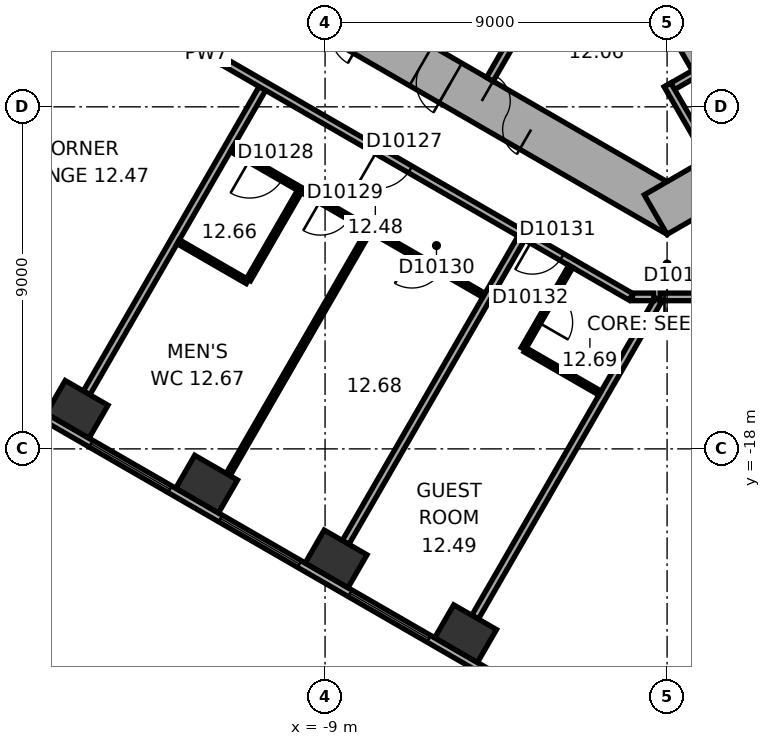
"""IFC4 building model, lengths in metres.
Left out: names, types, materials, properties, quantities, classifications, styles, units other than length and angle.
Written with IfcOpenShell. Run it as: python <this file> out.ifc"""

import sys

from ifc_helpers import new_model, si_unit, direction, frame, frame_2d, origin, origin_2d, place, context, subcontext, project, spatial, rectangle, extrude, element, fill, save


model = new_model("IFC4")
c1 = context("Model", 3, precision=1e-05, world=origin(), true_north=direction((0.0, 1.0)))
c2 = subcontext(c1, "Body", "Model", "MODEL_VIEW")
j1 = project(units=[si_unit("LENGTHUNIT", "METRE"), si_unit("PLANEANGLEUNIT", "RADIAN")], contexts=[c1])
p1 = place(None, origin())
s1 = spatial("IfcSite", under=j1, at=p1, CompositionType="ELEMENT")
p2 = place(p1, origin())
s2 = spatial("IfcBuilding", under=s1, at=p2, CompositionType="ELEMENT")
p3 = place(p2, frame((0.0, 0.0, 60.5)))
s3 = spatial("IfcBuildingStorey", under=s2, at=p3, CompositionType="ELEMENT", Elevation=60.5)
for number, where, z_axis, x_axis in (
    (1, (-15.524, -16.96, 0.0), (0.0, 0.0, 1.0), (0.866, -0.5, 0.0)),
    (2, (-12.117, -18.927, 0.0), (0.0, 0.0, 1.0), (0.866, -0.5, 0.0)),
    (3, (-8.71, -20.895, 0.0), (0.0, 0.0, 1.0), (0.866, -0.5, 0.0)),
    (4, (-5.302, -22.862, 0.0), (0.0, 0.0, 1.0), (0.866, -0.5, 0.0)),
):
    element("IfcColumn", number, at=place(p3, frame(where, z_axis=z_axis, x_axis=x_axis)), inside=s3, PredefinedType="COLUMN", context=c2, shape_type="SweptSolid", body=[
        extrude(rectangle(XDim=1.3, YDim=1.0, at=origin_2d()), origin(), (0.0, 0.0, 1.0), 3.3),
    ])
p4 = place(p3, frame((-10.4, -5.658, 0.0), z_axis=(0.0, 0.0, 1.0), x_axis=(0.866021384402, -0.500006961711, 0.0)))
e5 = element("IfcWall", 5, at=p4, inside=s3, PredefinedType="SHEAR", context=c2, shape_type="SweptSolid", body=[
    extrude(rectangle(XDim=12.355, YDim=1.2, at=frame_2d((6.178, 0.0))), origin(), (0.0, 0.0, 1.0), 3.3),
])
p5 = place(p4, frame((6.378, 0.0, 0.0)))
e6 = element("IfcOpeningElement", 6, at=p5, cuts=e5, PredefinedType="OPENING", context=c2, shape_type="SweptSolid", body=[
    extrude(rectangle(XDim=1.5, YDim=2.1, at=frame_2d((0.75, 1.05))), frame((0.0, 0.61, 0.0), z_axis=(0.0, -1.0, 0.0), x_axis=(1.0, 0.0, 0.0)), (0.0, 0.0, 1.0), 1.22),
])
p6 = place(p4, frame((1.928, 0.0, 0.0)))
e7 = element("IfcOpeningElement", 7, at=p6, cuts=e5, PredefinedType="OPENING", context=c2, shape_type="SweptSolid", body=[
    extrude(rectangle(XDim=0.9, YDim=2.1, at=frame_2d((0.45, 1.05))), frame((0.0, 0.61, 0.0), z_axis=(0.0, -1.0, 0.0), x_axis=(1.0, 0.0, 0.0)), (0.0, 0.0, 1.0), 1.22),
])
p7 = place(p4, frame((4.528, 0.0, 0.0)))
e8 = element("IfcOpeningElement", 8, at=p7, cuts=e5, PredefinedType="OPENING", context=c2, shape_type="SweptSolid", body=[
    extrude(rectangle(XDim=0.9, YDim=2.1, at=frame_2d((0.45, 1.05))), frame((0.0, 0.61, 0.0), z_axis=(0.0, -1.0, 0.0), x_axis=(1.0, 0.0, 0.0)), (0.0, 0.0, 1.0), 1.22),
])
p8 = place(p3, frame((-0.3, -11.836, 0.0), z_axis=(0.0, 0.0, 1.0), x_axis=(0.866021384402, 0.500006961711, 0.0)))
e9 = element("IfcWall", 9, at=p8, inside=s3, PredefinedType="SHEAR", context=c2, shape_type="SweptSolid", body=[
    extrude(rectangle(XDim=12.355, YDim=1.2, at=frame_2d((6.178, 0.0))), origin(), (0.0, 0.0, 1.0), 3.3),
])
p9 = place(p8, frame((4.128, 0.0, 0.0)))
e10 = element("IfcOpeningElement", 10, at=p9, cuts=e9, PredefinedType="OPENING", context=c2, shape_type="SweptSolid", body=[
    extrude(rectangle(XDim=0.9, YDim=2.1, at=frame_2d((0.45, 1.05))), frame((0.0, 0.61, 0.0), z_axis=(0.0, -1.0, 0.0), x_axis=(1.0, 0.0, 0.0)), (0.0, 0.0, 1.0), 1.22),
])
p10 = place(p8, frame((7.928, 0.0, 0.0)))
e11 = element("IfcOpeningElement", 11, at=p10, cuts=e9, PredefinedType="OPENING", context=c2, shape_type="SweptSolid", body=[
    extrude(rectangle(XDim=1.1, YDim=2.1, at=frame_2d((0.55, 1.05))), frame((0.0, 0.61, 0.0), z_axis=(0.0, -1.0, 0.0), x_axis=(1.0, 0.0, 0.0)), (0.0, 0.0, 1.0), 1.22),
])
p11 = place(p3, frame((-19.914, -15.119, 0.0), z_axis=(0.0, 0.0, 1.0), x_axis=(0.866025418898, -0.499999973822, 0.0)))
e12 = element("IfcWall", 12, at=p11, inside=s3, PredefinedType="STANDARD", context=c2, shape_type="SweptSolid", body=[
    extrude(rectangle(XDim=21.246, YDim=0.2, at=frame_2d((10.623, 0.0))), origin(), (0.0, 0.0, 1.0), 3.3),
])
p12 = place(p11, frame((1.555, 0.0, 0.8)))
e13 = element("IfcOpeningElement", 13, at=p12, cuts=e12, PredefinedType="OPENING", context=c2, shape_type="SweptSolid", body=[
    extrude(rectangle(XDim=2.4, YDim=1.7, at=frame_2d((1.2, 0.85))), frame((0.0, 0.11, 0.0), z_axis=(0.0, -1.0, 0.0), x_axis=(1.0, 0.0, 0.0)), (0.0, 0.0, 1.0), 0.22),
])
p13 = place(p11, frame((5.489, 0.0, 0.8)))
e14 = element("IfcOpeningElement", 14, at=p13, cuts=e12, PredefinedType="OPENING", context=c2, shape_type="SweptSolid", body=[
    extrude(rectangle(XDim=2.4, YDim=1.7, at=frame_2d((1.2, 0.85))), frame((0.0, 0.11, 0.0), z_axis=(0.0, -1.0, 0.0), x_axis=(1.0, 0.0, 0.0)), (0.0, 0.0, 1.0), 0.22),
])
p14 = place(p11, frame((9.424, 0.0, 0.8)))
e15 = element("IfcOpeningElement", 15, at=p14, cuts=e12, PredefinedType="OPENING", context=c2, shape_type="SweptSolid", body=[
    extrude(rectangle(XDim=2.4, YDim=1.7, at=frame_2d((1.2, 0.85))), frame((0.0, 0.11, 0.0), z_axis=(0.0, -1.0, 0.0), x_axis=(1.0, 0.0, 0.0)), (0.0, 0.0, 1.0), 0.22),
])
p15 = place(p11, frame((13.358, 0.0, 0.8)))
e16 = element("IfcOpeningElement", 16, at=p15, cuts=e12, PredefinedType="OPENING", context=c2, shape_type="SweptSolid", body=[
    extrude(rectangle(XDim=2.4, YDim=1.7, at=frame_2d((1.2, 0.85))), frame((0.0, 0.11, 0.0), z_axis=(0.0, -1.0, 0.0), x_axis=(1.0, 0.0, 0.0)), (0.0, 0.0, 1.0), 0.22),
])
p16 = place(p11, frame((17.293, 0.0, 0.8)))
e17 = element("IfcOpeningElement", 17, at=p16, cuts=e12, PredefinedType="OPENING", context=c2, shape_type="SweptSolid", body=[
    extrude(rectangle(XDim=2.4, YDim=1.7, at=frame_2d((1.2, 0.85))), frame((0.0, 0.11, 0.0), z_axis=(0.0, -1.0, 0.0), x_axis=(1.0, 0.0, 0.0)), (0.0, 0.0, 1.0), 0.22),
])
p17 = place(p3, frame((-3.563, -6.372, 0.0), z_axis=(0.0, 0.0, 1.0), x_axis=(-0.499994660107, -0.866028486751, 0.0)))
e18 = element("IfcWall", 18, at=p17, inside=s3, PredefinedType="PARTITIONING", context=c2, shape_type="SweptSolid", body=[
    extrude(rectangle(XDim=2.2, YDim=0.2, at=frame_2d((1.1, 0.0))), origin(), (0.0, 0.0, 1.0), 3.05),
])
p18 = place(p3, frame((-0.024, -8.559, 0.0), z_axis=(0.0, 0.0, 1.0), x_axis=(0.866026010844, 0.49999894854, 0.0)))
e19 = element("IfcWall", 19, at=p18, inside=s3, PredefinedType="PARTITIONING", context=c2, shape_type="SweptSolid", body=[
    extrude(rectangle(XDim=8.0, YDim=0.2, at=frame_2d((4.0, 0.0))), origin(), (0.0, 0.0, 1.0), 3.05),
])
p19 = place(p3, frame((0.013, -8.422, 0.0), z_axis=(0.0, 0.0, 1.0), x_axis=(0.500077893725, -0.86598042715, 0.0)))
e20 = element("IfcWall", 20, at=p19, inside=s3, PredefinedType="PARTITIONING", context=c2, shape_type="SweptSolid", body=[
    extrude(rectangle(XDim=2.2, YDim=0.2, at=frame_2d((1.1, 0.0))), origin(), (0.0, 0.0, 1.0), 3.05),
])
p20 = place(p3, frame((-1.558, -3.902, 0.0), z_axis=(0.0, 0.0, 1.0), x_axis=(0.499977259774, -0.866038532462, 0.0)))
e21 = element("IfcWall", 21, at=p20, inside=s3, PredefinedType="SHEAR", context=c2, shape_type="SweptSolid", body=[
    extrude(rectangle(XDim=4.7, YDim=0.3, at=frame_2d((2.35, 0.0))), origin(), (0.0, 0.0, 1.0), 3.05),
])
p21 = place(p20, frame((0.8, 0.0, 0.0)))
e22 = element("IfcOpeningElement", 22, at=p21, cuts=e21, PredefinedType="OPENING", context=c2, shape_type="SweptSolid", body=[
    extrude(rectangle(XDim=1.2, YDim=2.1, at=frame_2d((0.6, 1.05))), frame((0.0, 0.16, 0.0), z_axis=(0.0, -1.0, 0.0), x_axis=(1.0, 0.0, 0.0)), (0.0, 0.0, 1.0), 0.32),
])
p22 = place(p3, frame((-15.274, -16.527, 0.0), z_axis=(0.0, 0.0, 1.0), x_axis=(0.49998823431, 0.866032196602, 0.0)))
e23 = element("IfcWall", 23, at=p22, inside=s3, PredefinedType="PARTITIONING", context=c2, shape_type="SweptSolid", body=[
    extrude(rectangle(XDim=9.25, YDim=0.2, at=frame_2d((4.625, 0.0))), origin(), (0.0, 0.0, 1.0), 3.05),
])
p23 = place(p3, frame((-12.863, -12.55, 0.0), z_axis=(0.0, 0.0, 1.0), x_axis=(0.866009402589, -0.500027713859, 0.0)))
e24 = element("IfcWall", 24, at=p23, inside=s3, PredefinedType="PARTITIONING", context=c2, shape_type="SweptSolid", body=[
    extrude(rectangle(XDim=2.1, YDim=0.12, at=frame_2d((1.05, 0.0))), origin(), (0.0, 0.0, 1.0), 3.05),
])
p24 = place(p3, frame((-12.6, -6.177, 0.0), z_axis=(0.0, 0.0, 1.0), x_axis=(0.500063520245, -0.865988727248, 0.0)))
e25 = element("IfcWall", 25, at=p24, inside=s3, PredefinedType="PARTITIONING", context=c2, shape_type="SweptSolid", body=[
    extrude(rectangle(XDim=1.9, YDim=0.2, at=frame_2d((0.95, 0.0))), origin(), (0.0, 0.0, 1.0), 3.05),
])
p25 = place(p24, frame((0.45, 0.0, 0.0)))
e26 = element("IfcOpeningElement", 26, at=p25, cuts=e25, PredefinedType="OPENING", context=c2, shape_type="SweptSolid", body=[
    extrude(rectangle(XDim=1.0, YDim=2.1, at=frame_2d((0.5, 1.05))), frame((0.0, 0.11, 0.0), z_axis=(0.0, -1.0, 0.0), x_axis=(1.0, 0.0, 0.0)), (0.0, 0.0, 1.0), 0.22),
])
p26 = place(p3, frame((-11.615, -7.843, 0.0), z_axis=(0.0, 0.0, 1.0), x_axis=(0.866026466995, -0.499998158461, 0.0)))
e27 = element("IfcWall", 27, at=p26, inside=s3, PredefinedType="PARTITIONING", context=c2, shape_type="SweptSolid", body=[
    extrude(rectangle(XDim=12.315, YDim=0.2, at=frame_2d((6.158, 0.0))), origin(), (0.0, 0.0, 1.0), 3.05),
])
p27 = place(p26, frame((4.608, 0.0, 0.0)))
e28 = element("IfcOpeningElement", 28, at=p27, cuts=e27, PredefinedType="OPENING", context=c2, shape_type="SweptSolid", body=[
    extrude(rectangle(XDim=1.0, YDim=2.1, at=frame_2d((0.5, 1.05))), frame((0.0, 0.11, 0.0), z_axis=(0.0, -1.0, 0.0), x_axis=(1.0, 0.0, 0.0)), (0.0, 0.0, 1.0), 0.22),
])
p28 = place(p26, frame((9.317, 0.0, 0.0)))
e29 = element("IfcOpeningElement", 29, at=p28, cuts=e27, PredefinedType="OPENING", context=c2, shape_type="SweptSolid", body=[
    extrude(rectangle(XDim=0.9, YDim=2.1, at=frame_2d((0.45, 1.05))), frame((0.0, 0.11, 0.0), z_axis=(0.0, -1.0, 0.0), x_axis=(1.0, 0.0, 0.0)), (0.0, 0.0, 1.0), 0.22),
])
p29 = place(p3, frame((-11.551, -18.677, 0.0), z_axis=(0.0, 0.0, 1.0), x_axis=(0.500008425378, 0.866020539336, 0.0)))
e30 = element("IfcWall", 30, at=p29, inside=s3, PredefinedType="PARTITIONING", context=c2, shape_type="SweptSolid", body=[
    extrude(rectangle(XDim=7.39, YDim=0.12, at=frame_2d((3.695, 0.0))), origin(), (0.0, 0.0, 1.0), 2.6),
])
p30 = place(p3, frame((-11.463, -10.125, 0.0), z_axis=(0.0, 0.0, 1.0), x_axis=(0.866014882148, -0.500018223566, 0.0)))
e31 = element("IfcWall", 31, at=p30, inside=s3, PredefinedType="PARTITIONING", context=c2, shape_type="SweptSolid", body=[
    extrude(rectangle(XDim=7.669, YDim=0.12, at=frame_2d((3.834, 0.0))), origin(), (0.0, 0.0, 1.0), 3.05),
])
p31 = place(p30, frame((0.55, 0.0, 0.0)))
e32 = element("IfcOpeningElement", 32, at=p31, cuts=e31, PredefinedType="OPENING", context=c2, shape_type="SweptSolid", body=[
    extrude(rectangle(XDim=1.0, YDim=2.1, at=frame_2d((0.5, 1.05))), frame((0.0, 0.07, 0.0), z_axis=(0.0, -1.0, 0.0), x_axis=(1.0, 0.0, 0.0)), (0.0, 0.0, 1.0), 0.14),
])
p32 = place(p30, frame((2.7, 0.0, 0.0)))
e33 = element("IfcOpeningElement", 33, at=p32, cuts=e31, PredefinedType="OPENING", context=c2, shape_type="SweptSolid", body=[
    extrude(rectangle(XDim=0.9, YDim=2.1, at=frame_2d((0.45, 1.05))), frame((0.0, 0.07, 0.0), z_axis=(0.0, -1.0, 0.0), x_axis=(1.0, 0.0, 0.0)), (0.0, 0.0, 1.0), 0.14),
])
p33 = place(p30, frame((5.485, 0.0, 0.0)))
e34 = element("IfcOpeningElement", 34, at=p33, cuts=e31, PredefinedType="OPENING", context=c2, shape_type="SweptSolid", body=[
    extrude(rectangle(XDim=0.9, YDim=2.1, at=frame_2d((0.45, 1.05))), frame((0.0, 0.07, 0.0), z_axis=(0.0, -1.0, 0.0), x_axis=(1.0, 0.0, 0.0)), (0.0, 0.0, 1.0), 0.14),
])
p34 = place(p3, frame((-11.014, -13.548, 0.0), z_axis=(0.0, 0.0, 1.0), x_axis=(0.499980071345, 0.866036909293, 0.0)))
e35 = element("IfcWall", 35, at=p34, inside=s3, PredefinedType="PARTITIONING", context=c2, shape_type="SweptSolid", body=[
    extrude(rectangle(XDim=2.68, YDim=0.12, at=frame_2d((1.34, 0.0))), origin(), (0.0, 0.0, 1.0), 3.05),
])
p35 = place(p3, frame((-8.46, -20.461, 0.0), z_axis=(0.0, 0.0, 1.0), x_axis=(0.499999662836, 0.866025598446, 0.0)))
e36 = element("IfcWall", 36, at=p35, inside=s3, PredefinedType="PARTITIONING", context=c2, shape_type="SweptSolid", body=[
    extrude(rectangle(XDim=9.25, YDim=0.2, at=frame_2d((4.625, 0.0))), origin(), (0.0, 0.0, 1.0), 3.05),
])
p36 = place(p3, frame((-5.052, -22.429, 0.0), z_axis=(0.0, 0.0, 1.0), x_axis=(0.50000569793, 0.866022114058, 0.0)))
e37 = element("IfcWall", 37, at=p36, inside=s3, PredefinedType="PARTITIONING", context=c2, shape_type="SweptSolid", body=[
    extrude(rectangle(XDim=9.65, YDim=0.2, at=frame_2d((4.825, 0.0))), origin(), (0.0, 0.0, 1.0), 3.05),
])
p37 = place(p3, frame((-3.786, -15.366, 0.0), z_axis=(0.0, 0.0, 1.0), x_axis=(0.500004234368, 0.866022959057, 0.0)))
e38 = element("IfcWall", 38, at=p37, inside=s3, PredefinedType="PARTITIONING", context=c2, shape_type="SweptSolid", body=[
    extrude(rectangle(XDim=2.5, YDim=0.12, at=frame_2d((1.25, 0.0))), origin(), (0.0, 0.0, 1.0), 3.05),
])
p38 = place(p37, frame((0.8, 0.0, 0.0)))
e39 = element("IfcOpeningElement", 39, at=p38, cuts=e38, PredefinedType="OPENING", context=c2, shape_type="SweptSolid", body=[
    extrude(rectangle(XDim=0.9, YDim=2.1, at=frame_2d((0.45, 1.05))), frame((0.0, 0.07, 0.0), z_axis=(0.0, -1.0, 0.0), x_axis=(1.0, 0.0, 0.0)), (0.0, 0.0, 1.0), 0.14),
])
p39 = place(p3, frame((-1.764, -16.533, 0.0), z_axis=(0.0, 0.0, 1.0), x_axis=(-0.866008641419, 0.500029032144, 0.0)))
e40 = element("IfcWall", 40, at=p39, inside=s3, PredefinedType="PARTITIONING", context=c2, shape_type="SweptSolid", body=[
    extrude(rectangle(XDim=2.275, YDim=0.12, at=frame_2d((1.137, 0.0))), origin(), (0.0, 0.0, 1.0), 3.05),
])
p40 = place(p3, frame((-0.91, -14.001, 0.0), z_axis=(0.0, 0.0, 1.0), x_axis=(1.0, 0.0, 0.0)))
e41 = element("IfcWall", 41, at=p40, inside=s3, PredefinedType="PARTITIONING", context=c2, shape_type="SweptSolid", body=[
    extrude(rectangle(XDim=0.56, YDim=0.2, at=frame_2d((0.28, 0.0))), origin(), (0.0, 0.0, 1.0), 3.05),
])
p41 = place(p3, frame((-0.186, -14.001, 0.0), z_axis=(0.0, 0.0, 1.0), x_axis=(1.0, 0.0, 0.0)))
e42 = element("IfcWall", 42, at=p41, inside=s3, PredefinedType="PARTITIONING", context=c2, shape_type="SweptSolid", body=[
    extrude(rectangle(XDim=1.136, YDim=0.2, at=frame_2d((0.568, 0.0))), origin(), (0.0, 0.0, 1.0), 3.05),
])
p42 = place(p41, frame((0.118, 0.0, 0.0)))
e43 = element("IfcOpeningElement", 43, at=p42, cuts=e42, PredefinedType="OPENING", context=c2, shape_type="SweptSolid", body=[
    extrude(rectangle(XDim=0.9, YDim=2.1, at=frame_2d((0.45, 1.05))), frame((0.0, 0.11, 0.0), z_axis=(0.0, -1.0, 0.0), x_axis=(1.0, 0.0, 0.0)), (0.0, 0.0, 1.0), 0.22),
])
p43 = place(p13, origin())
e44 = element("IfcWindow", 44, at=p43, inside=s3, PartitioningType="SINGLE_PANEL", PredefinedType="WINDOW", context=c2, shape_type="SweptSolid", body=[
    extrude(rectangle(XDim=2.4, YDim=1.7, at=frame_2d((1.2, 0.85))), frame((0.0, 0.03, 0.0), z_axis=(0.0, -1.0, 0.0), x_axis=(1.0, 0.0, 0.0)), (0.0, 0.0, 1.0), 0.06),
])
fill(e14, e44)
p44 = place(p14, origin())
e45 = element("IfcWindow", 45, at=p44, inside=s3, PartitioningType="SINGLE_PANEL", PredefinedType="WINDOW", context=c2, shape_type="SweptSolid", body=[
    extrude(rectangle(XDim=2.4, YDim=1.7, at=frame_2d((1.2, 0.85))), frame((0.0, 0.03, 0.0), z_axis=(0.0, -1.0, 0.0), x_axis=(1.0, 0.0, 0.0)), (0.0, 0.0, 1.0), 0.06),
])
fill(e15, e45)
p45 = place(p15, origin())
e46 = element("IfcWindow", 46, at=p45, inside=s3, PartitioningType="SINGLE_PANEL", PredefinedType="WINDOW", context=c2, shape_type="SweptSolid", body=[
    extrude(rectangle(XDim=2.4, YDim=1.7, at=frame_2d((1.2, 0.85))), frame((0.0, 0.03, 0.0), z_axis=(0.0, -1.0, 0.0), x_axis=(1.0, 0.0, 0.0)), (0.0, 0.0, 1.0), 0.06),
])
fill(e16, e46)
p46 = place(p5, origin())
e47 = element("IfcDoor", 47, at=p46, inside=s3, OperationType="DOUBLE_DOOR_SINGLE_SWING", PredefinedType="DOOR", context=c2, shape_type="SweptSolid", body=[
    extrude(rectangle(XDim=1.5, YDim=2.1, at=frame_2d((0.75, 1.05))), frame((0.0, 0.025, 0.0), z_axis=(0.0, -1.0, 0.0), x_axis=(1.0, 0.0, 0.0)), (0.0, 0.0, 1.0), 0.05),
])
fill(e6, e47)
p47 = place(p7, origin())
e48 = element("IfcDoor", 48, at=p47, inside=s3, OperationType="SINGLE_SWING_LEFT", PredefinedType="DOOR", context=c2, shape_type="SweptSolid", body=[
    extrude(rectangle(XDim=0.9, YDim=2.1, at=frame_2d((0.45, 1.05))), frame((0.0, 0.025, 0.0), z_axis=(0.0, -1.0, 0.0), x_axis=(1.0, 0.0, 0.0)), (0.0, 0.0, 1.0), 0.05),
])
fill(e8, e48)
p48 = place(p27, origin())
e49 = element("IfcDoor", 49, at=p48, inside=s3, OperationType="SINGLE_SWING_LEFT", PredefinedType="DOOR", context=c2, shape_type="SweptSolid", body=[
    extrude(rectangle(XDim=1.0, YDim=2.1, at=frame_2d((0.5, 1.05))), frame((0.0, 0.025, 0.0), z_axis=(0.0, -1.0, 0.0), x_axis=(1.0, 0.0, 0.0)), (0.0, 0.0, 1.0), 0.05),
])
fill(e28, e49)
p49 = place(p31, origin())
e50 = element("IfcDoor", 50, at=p49, inside=s3, OperationType="SINGLE_SWING_LEFT", PredefinedType="DOOR", context=c2, shape_type="SweptSolid", body=[
    extrude(rectangle(XDim=1.0, YDim=2.1, at=frame_2d((0.5, 1.05))), frame((0.0, 0.025, 0.0), z_axis=(0.0, -1.0, 0.0), x_axis=(1.0, 0.0, 0.0)), (0.0, 0.0, 1.0), 0.05),
])
fill(e32, e50)
p50 = place(p32, origin())
e51 = element("IfcDoor", 51, at=p50, inside=s3, OperationType="SINGLE_SWING_LEFT", PredefinedType="DOOR", context=c2, shape_type="SweptSolid", body=[
    extrude(rectangle(XDim=0.9, YDim=2.1, at=frame_2d((0.45, 1.05))), frame((0.0, 0.025, 0.0), z_axis=(0.0, -1.0, 0.0), x_axis=(1.0, 0.0, 0.0)), (0.0, 0.0, 1.0), 0.05),
])
fill(e33, e51)
p51 = place(p33, origin())
e52 = element("IfcDoor", 52, at=p51, inside=s3, OperationType="SINGLE_SWING_LEFT", PredefinedType="DOOR", context=c2, shape_type="SweptSolid", body=[
    extrude(rectangle(XDim=0.9, YDim=2.1, at=frame_2d((0.45, 1.05))), frame((0.0, 0.025, 0.0), z_axis=(0.0, -1.0, 0.0), x_axis=(1.0, 0.0, 0.0)), (0.0, 0.0, 1.0), 0.05),
])
fill(e34, e52)
p52 = place(p28, origin())
e53 = element("IfcDoor", 53, at=p52, inside=s3, OperationType="SINGLE_SWING_LEFT", PredefinedType="DOOR", context=c2, shape_type="SweptSolid", body=[
    extrude(rectangle(XDim=0.9, YDim=2.1, at=frame_2d((0.45, 1.05))), frame((0.0, 0.025, 0.0), z_axis=(0.0, -1.0, 0.0), x_axis=(1.0, 0.0, 0.0)), (0.0, 0.0, 1.0), 0.05),
])
fill(e29, e53)
p53 = place(p38, origin())
e54 = element("IfcDoor", 54, at=p53, inside=s3, OperationType="SINGLE_SWING_LEFT", PredefinedType="DOOR", context=c2, shape_type="SweptSolid", body=[
    extrude(rectangle(XDim=0.9, YDim=2.1, at=frame_2d((0.45, 1.05))), frame((0.0, 0.025, 0.0), z_axis=(0.0, -1.0, 0.0), x_axis=(1.0, 0.0, 0.0)), (0.0, 0.0, 1.0), 0.05),
])
fill(e39, e54)
p54 = place(p42, origin())
e55 = element("IfcDoor", 55, at=p54, inside=s3, OperationType="SINGLE_SWING_LEFT", PredefinedType="DOOR", context=c2, shape_type="SweptSolid", body=[
    extrude(rectangle(XDim=0.9, YDim=2.1, at=frame_2d((0.45, 1.05))), frame((0.0, 0.025, 0.0), z_axis=(0.0, -1.0, 0.0), x_axis=(1.0, 0.0, 0.0)), (0.0, 0.0, 1.0), 0.05),
])
fill(e43, e55)
save(model, sys.argv[1])
